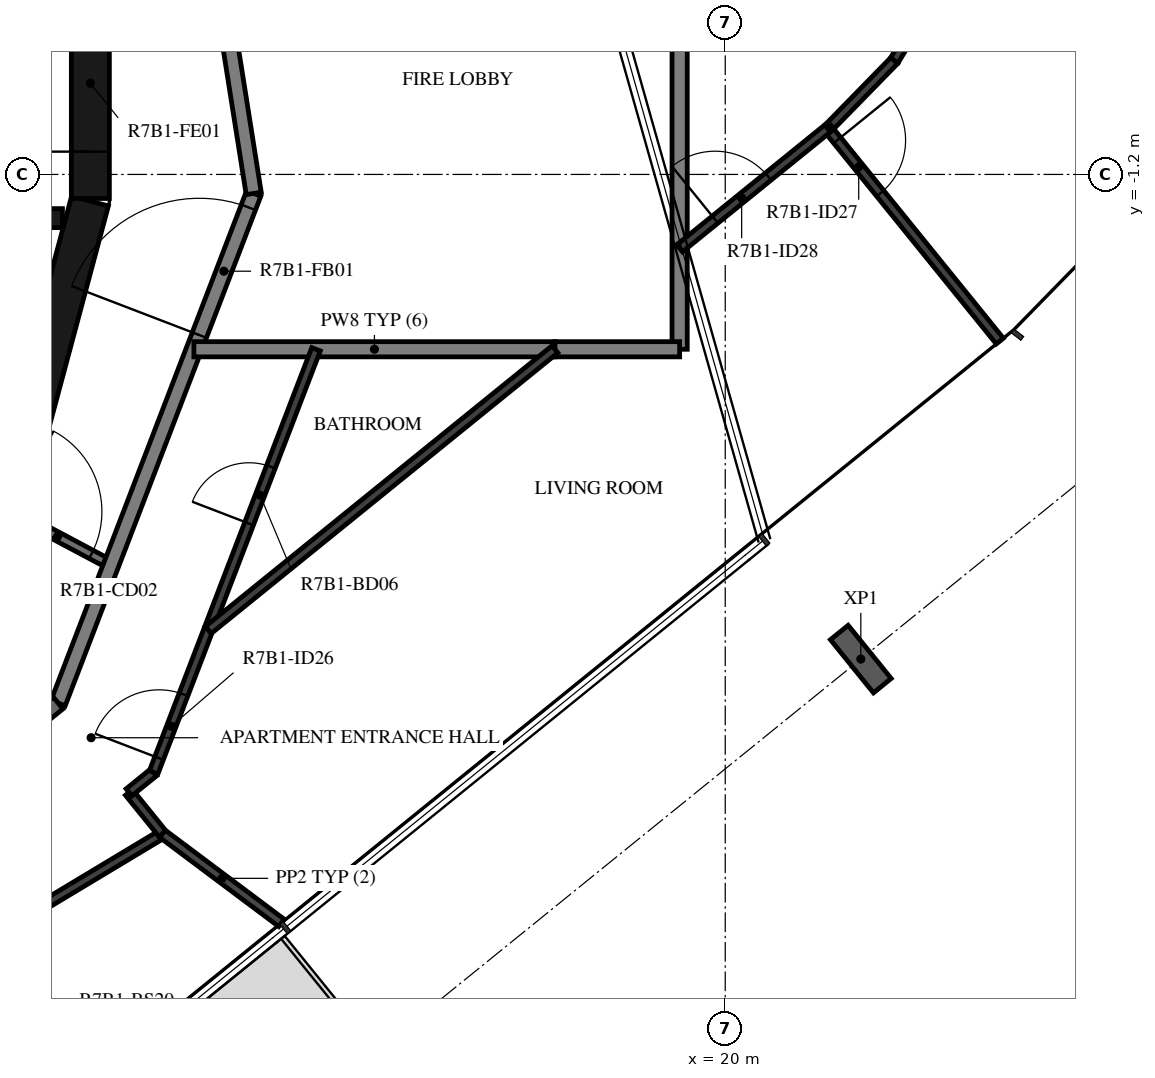
"""IFC4 building model, lengths in metres.
Left out: names, types, materials, properties, quantities, classifications, styles, units other than length and angle.
Written with IfcOpenShell. Run it as: python <this file> out.ifc"""

import sys

from ifc_helpers import new_model, si_unit, direction, frame, frame_2d, origin, origin_2d, place, context, subcontext, project, spatial, rectangle, i_section, extrude, element, fill, save


model = new_model("IFC4")
c1 = context("Model", 3, precision=1e-05, world=origin(), true_north=direction((0.0, 1.0)))
c2 = subcontext(c1, "Body", "Model", "MODEL_VIEW")
j1 = project(units=[si_unit("LENGTHUNIT", "METRE"), si_unit("PLANEANGLEUNIT", "RADIAN")], contexts=[c1])
p1 = place(None, origin())
s1 = spatial("IfcSite", under=j1, at=p1, CompositionType="ELEMENT")
p2 = place(p1, origin())
s2 = spatial("IfcBuilding", under=s1, at=p2, CompositionType="ELEMENT")
p3 = place(p2, frame((0.0, 0.0, 273.9)))
s3 = spatial("IfcBuildingStorey", under=s2, at=p3, CompositionType="ELEMENT", Elevation=273.9)
p4 = place(p3, frame((21.784, -7.576, -0.38), z_axis=(0.0, 0.0, 1.0), x_axis=(-0.777146167973, -0.629320136024, 0.0)))
e1 = element("IfcColumn", 1, at=p4, inside=s3, PredefinedType="COLUMN", context=c2, shape_type="SweptSolid", body=[
    extrude(i_section(OverallWidth=0.3, OverallDepth=0.9, WebThickness=0.019, FlangeThickness=0.035, FilletRadius=0.03, at=origin_2d()), origin(), (0.0, 0.0, 1.0), 3.5),
])
p5 = place(p3, frame((10.858, -4.479, 0.0), z_axis=(0.0, 0.0, 1.0), x_axis=(0.258734743916, 0.965948410781, 0.0)))
e2 = element("IfcWall", 2, at=p5, inside=s3, PredefinedType="SHEAR", context=c2, shape_type="SweptSolid", body=[
    extrude(rectangle(XDim=3.033, YDim=0.5, at=frame_2d((1.516, 0.0))), origin(), (0.0, 0.0, 1.0), 3.12),
])
p6 = place(p3, frame((11.647, -1.516, 0.0), z_axis=(0.0, 0.0, 1.0), x_axis=(0.0, 1.0, 0.0)))
e3 = element("IfcWall", 3, at=p6, inside=s3, PredefinedType="SHEAR", context=c2, shape_type="SweptSolid", body=[
    extrude(rectangle(XDim=3.033, YDim=0.5, at=frame_2d((1.516, 0.0))), origin(), (0.0, 0.0, 1.0), 3.12),
])
p7 = place(p6, frame((0.616, 0.0, 0.0)))
e4 = element("IfcOpeningElement", 4, at=p7, cuts=e3, PredefinedType="OPENING", context=c2, shape_type="SweptSolid", body=[
    extrude(rectangle(XDim=1.8, YDim=2.1, at=frame_2d((0.9, 1.05))), frame((0.0, 0.26, 0.0), z_axis=(0.0, -1.0, 0.0), x_axis=(1.0, 0.0, 0.0)), (0.0, 0.0, 1.0), 0.52),
])
p8 = place(p3, frame((3.35, -1.775, 0.0), z_axis=(0.0, 0.0, 1.0), x_axis=(1.0, 0.0, 0.0)))
e5 = element("IfcWall", 5, at=p8, inside=s3, PredefinedType="SHEAR", context=c2, shape_type="SweptSolid", body=[
    extrude(rectangle(XDim=7.93, YDim=0.25, at=frame_2d((3.965, 0.0))), origin(), (0.0, 0.0, 1.0), 3.12),
])
p9 = place(p8, frame((0.4, 0.0, 0.0)))
e6 = element("IfcOpeningElement", 6, at=p9, cuts=e5, PredefinedType="OPENING", context=c2, shape_type="SweptSolid", body=[
    extrude(rectangle(XDim=1.1, YDim=2.4, at=frame_2d((0.55, 1.2))), frame((0.0, 0.135, 0.0), z_axis=(0.0, -1.0, 0.0), x_axis=(1.0, 0.0, 0.0)), (0.0, 0.0, 1.0), 0.27),
])
p10 = place(p8, frame((2.55, 0.0, 0.0)))
e7 = element("IfcOpeningElement", 7, at=p10, cuts=e5, PredefinedType="OPENING", context=c2, shape_type="SweptSolid", body=[
    extrude(rectangle(XDim=1.1, YDim=2.4, at=frame_2d((0.55, 1.2))), frame((0.0, 0.135, 0.0), z_axis=(0.0, -1.0, 0.0), x_axis=(1.0, 0.0, 0.0)), (0.0, 0.0, 1.0), 0.27),
])
p11 = place(p8, frame((4.7, 0.0, 0.0)))
e8 = element("IfcOpeningElement", 8, at=p11, cuts=e5, PredefinedType="OPENING", context=c2, shape_type="SweptSolid", body=[
    extrude(rectangle(XDim=1.1, YDim=2.4, at=frame_2d((0.55, 1.2))), frame((0.0, 0.135, 0.0), z_axis=(0.0, -1.0, 0.0), x_axis=(1.0, 0.0, 0.0)), (0.0, 0.0, 1.0), 0.27),
])
p12 = place(p3, frame((10.511, -5.589, 0.0), z_axis=(0.0, 0.0, 1.0), x_axis=(0.882983002821, -0.469404960273, 0.0)))
e9 = element("IfcWall", 9, at=p12, inside=s3, PredefinedType="PARTITIONING", context=c2, shape_type="SweptSolid", body=[
    extrude(rectangle(XDim=1.596, YDim=0.12, at=frame_2d((0.798, 0.0))), origin(), (0.0, 0.0, 1.0), 3.12),
])
p13 = place(p12, frame((0.1, 0.0, 0.0)))
e10 = element("IfcOpeningElement", 10, at=p13, cuts=e9, PredefinedType="OPENING", context=c2, shape_type="SweptSolid", body=[
    extrude(rectangle(XDim=1.2, YDim=2.1, at=frame_2d((0.6, 1.05))), frame((0.0, 0.07, 0.0), z_axis=(0.0, -1.0, 0.0), x_axis=(1.0, 0.0, 0.0)), (0.0, 0.0, 1.0), 0.14),
])
p14 = place(p3, frame((11.223, -8.154, 0.0), z_axis=(0.0, 0.0, 1.0), x_axis=(0.358341090983, 0.93359073609, 0.0)))
e11 = element("IfcWall", 11, at=p14, inside=s3, PredefinedType="STANDARD", context=c2, shape_type="SweptSolid", body=[
    extrude(rectangle(XDim=7.181, YDim=0.2, at=frame_2d((3.59, 0.0))), origin(), (0.0, 0.0, 1.0), 3.12),
])
p15 = place(p14, frame((5.185, 0.0, 0.0)))
e12 = element("IfcOpeningElement", 12, at=p15, cuts=e11, PredefinedType="OPENING", context=c2, shape_type="SweptSolid", body=[
    extrude(rectangle(XDim=1.8, YDim=2.1, at=frame_2d((0.9, 1.05))), frame((0.0, 0.11, 0.0), z_axis=(0.0, -1.0, 0.0), x_axis=(1.0, 0.0, 0.0)), (0.0, 0.0, 1.0), 0.22),
])
p16 = place(p3, frame((13.797, -1.45, 0.0), z_axis=(0.0, 0.0, 1.0), x_axis=(-0.156421704315, 0.987690361611, 0.0)))
e13 = element("IfcWall", 13, at=p16, inside=s3, PredefinedType="STANDARD", context=c2, shape_type="SweptSolid", body=[
    extrude(rectangle(XDim=7.181, YDim=0.2, at=frame_2d((3.591, 0.0))), origin(), (0.0, 0.0, 1.0), 3.12),
])
p17 = place(p3, frame((5.643, -12.673, 0.0), z_axis=(0.0, 0.0, 1.0), x_axis=(0.777160148113, 0.629302871585, 0.0)))
e14 = element("IfcWall", 14, at=p17, inside=s3, PredefinedType="STANDARD", context=c2, shape_type="SweptSolid", body=[
    extrude(rectangle(XDim=7.181, YDim=0.2, at=frame_2d((3.59, 0.0))), origin(), (0.0, 0.0, 1.0), 3.12),
])
p18 = place(p17, frame((0.2, 0.0, 0.0)))
e15 = element("IfcOpeningElement", 15, at=p18, cuts=e14, PredefinedType="OPENING", context=c2, shape_type="SweptSolid", body=[
    extrude(rectangle(XDim=1.0, YDim=2.1, at=frame_2d((0.5, 1.05))), frame((0.0, 0.11, 0.0), z_axis=(0.0, -1.0, 0.0), x_axis=(1.0, 0.0, 0.0)), (0.0, 0.0, 1.0), 0.22),
])
p19 = place(p3, frame((13.01, -3.5, 0.0), z_axis=(0.0, 0.0, 1.0), x_axis=(1.0, 0.0, 0.0)))
e16 = element("IfcWall", 16, at=p19, inside=s3, PredefinedType="STANDARD", context=c2, shape_type="SweptSolid", body=[
    extrude(rectangle(XDim=4.75, YDim=0.2, at=frame_2d((2.375, 0.0))), origin(), (0.0, 0.0, 1.0), 3.12),
])
p20 = place(p3, frame((19.4, -3.5, 0.0), z_axis=(0.0, 0.0, 1.0), x_axis=(0.0, 1.0, 0.0)))
e17 = element("IfcWall", 17, at=p20, inside=s3, PredefinedType="STANDARD", context=c2, shape_type="SweptSolid", body=[
    extrude(rectangle(XDim=5.021, YDim=0.2, at=frame_2d((2.511, 0.0))), origin(), (0.0, 0.0, 1.0), 3.12),
])
p21 = place(p3, frame((17.76, -3.5, 0.0), z_axis=(0.0, 0.0, 1.0), x_axis=(1.0, 0.0, 0.0)))
e18 = element("IfcWall", 18, at=p21, inside=s3, PredefinedType="STANDARD", context=c2, shape_type="SweptSolid", body=[
    extrude(rectangle(XDim=1.64, YDim=0.2, at=frame_2d((0.82, 0.0))), origin(), (0.0, 0.0, 1.0), 3.12),
])
p22 = place(p3, frame((10.434, -11.175, 0.0), z_axis=(0.0, 0.0, 1.0), x_axis=(0.857117202926, 0.515121442427, 0.0)))
e19 = element("IfcWall", 19, at=p22, inside=s3, PredefinedType="PARTITIONING", context=c2, shape_type="SweptSolid", body=[
    extrude(rectangle(XDim=2.524, YDim=0.12, at=frame_2d((1.262, 0.0))), origin(), (0.0, 0.0, 1.0), 3.12),
])
p23 = place(p3, frame((12.597, -9.875, 0.0), z_axis=(0.0, 0.0, 1.0), x_axis=(-0.629138198612, 0.77729346263, 0.0)))
e20 = element("IfcWall", 20, at=p23, inside=s3, PredefinedType="PARTITIONING", context=c2, shape_type="SweptSolid", body=[
    extrude(rectangle(XDim=0.702, YDim=0.12, at=frame_2d((0.351, 0.0))), origin(), (0.0, 0.0, 1.0), 3.12),
])
p24 = place(p3, frame((12.156, -9.329, 0.0), z_axis=(0.0, 0.0, 1.0), x_axis=(0.777026645941, 0.629467704888, 0.0)))
e21 = element("IfcWall", 21, at=p24, inside=s3, PredefinedType="PARTITIONING", context=c2, shape_type="SweptSolid", body=[
    extrude(rectangle(XDim=0.417, YDim=0.12, at=frame_2d((0.208, 0.0))), origin(), (0.0, 0.0, 1.0), 3.12),
])
p25 = place(p3, frame((12.479, -9.067, 0.0), z_axis=(0.0, 0.0, 1.0), x_axis=(0.358372669661, 0.933578614601, 0.0)))
e22 = element("IfcWall", 22, at=p25, inside=s3, PredefinedType="PARTITIONING", context=c2, shape_type="SweptSolid", body=[
    extrude(rectangle(XDim=5.963, YDim=0.12, at=frame_2d((2.981, 0.0))), origin(), (0.0, 0.0, 1.0), 3.12),
])
p26 = place(p25, frame((0.2, 0.0, 0.0)))
e23 = element("IfcOpeningElement", 23, at=p26, cuts=e22, PredefinedType="OPENING", context=c2, shape_type="SweptSolid", body=[
    extrude(rectangle(XDim=0.9, YDim=2.1, at=frame_2d((0.45, 1.05))), frame((0.0, 0.07, 0.0), z_axis=(0.0, -1.0, 0.0), x_axis=(1.0, 0.0, 0.0)), (0.0, 0.0, 1.0), 0.14),
])
p27 = place(p25, frame((3.507, 0.0, 0.0)))
e24 = element("IfcOpeningElement", 24, at=p27, cuts=e22, PredefinedType="OPENING", context=c2, shape_type="SweptSolid", body=[
    extrude(rectangle(XDim=0.8, YDim=2.1, at=frame_2d((0.4, 1.05))), frame((0.0, 0.07, 0.0), z_axis=(0.0, -1.0, 0.0), x_axis=(1.0, 0.0, 0.0)), (0.0, 0.0, 1.0), 0.14),
])
p28 = place(p3, frame((22.746, 1.168, 0.0), z_axis=(0.0, 0.0, 1.0), x_axis=(-0.515096534995, -0.857132171626, 0.0)))
e25 = element("IfcWall", 25, at=p28, inside=s3, PredefinedType="PARTITIONING", context=c2, shape_type="SweptSolid", body=[
    extrude(rectangle(XDim=1.016, YDim=0.12, at=frame_2d((0.508, 0.0))), origin(), (0.0, 0.0, 1.0), 3.12),
])
p29 = place(p3, frame((22.223, 0.298, 0.0), z_axis=(0.0, 0.0, 1.0), x_axis=(-0.69880109182, -0.715316037896, 0.0)))
e26 = element("IfcWall", 26, at=p29, inside=s3, PredefinedType="PARTITIONING", context=c2, shape_type="SweptSolid", body=[
    extrude(rectangle(XDim=1.227, YDim=0.12, at=frame_2d((0.614, 0.0))), origin(), (0.0, 0.0, 1.0), 3.12),
])
p30 = place(p3, frame((21.347, -0.595, 0.0), z_axis=(0.0, 0.0, 1.0), x_axis=(0.62934843781, -0.7771232488, 0.0)))
e27 = element("IfcWall", 27, at=p30, inside=s3, PredefinedType="PARTITIONING", context=c2, shape_type="SweptSolid", body=[
    extrude(rectangle(XDim=3.6, YDim=0.12, at=frame_2d((1.8, 0.0))), origin(), (0.0, 0.0, 1.0), 3.12),
])
p31 = place(p30, frame((0.2, 0.0, 0.0)))
e28 = element("IfcOpeningElement", 28, at=p31, cuts=e27, PredefinedType="OPENING", context=c2, shape_type="SweptSolid", body=[
    extrude(rectangle(XDim=0.9, YDim=2.1, at=frame_2d((0.45, 1.05))), frame((0.0, 0.07, 0.0), z_axis=(0.0, -1.0, 0.0), x_axis=(1.0, 0.0, 0.0)), (0.0, 0.0, 1.0), 0.14),
])
p32 = place(p3, frame((19.4, -2.172, 0.0), z_axis=(0.0, 0.0, 1.0), x_axis=(0.777147279935, 0.629318762862, 0.0)))
e29 = element("IfcWall", 29, at=p32, inside=s3, PredefinedType="PARTITIONING", context=c2, shape_type="SweptSolid", body=[
    extrude(rectangle(XDim=2.505, YDim=0.12, at=frame_2d((1.253, 0.0))), origin(), (0.0, 0.0, 1.0), 3.12),
])
p33 = place(p32, frame((0.6, 0.0, 0.0)))
e30 = element("IfcOpeningElement", 30, at=p33, cuts=e29, PredefinedType="OPENING", context=c2, shape_type="SweptSolid", body=[
    extrude(rectangle(XDim=0.9, YDim=2.1, at=frame_2d((0.45, 1.05))), frame((0.0, 0.07, 0.0), z_axis=(0.0, -1.0, 0.0), x_axis=(1.0, 0.0, 0.0)), (0.0, 0.0, 1.0), 0.14),
])
p34 = place(p3, frame((14.161, -11.046, 0.0), z_axis=(0.0, 0.0, 1.0), x_axis=(-0.800434550749, 0.599420161463, 0.0)))
e31 = element("IfcWall", 31, at=p34, inside=s3, PredefinedType="PARTITIONING", context=c2, shape_type="SweptSolid", body=[
    extrude(rectangle(XDim=1.954, YDim=0.12, at=frame_2d((0.977, 0.0))), origin(), (0.0, 0.0, 1.0), 2.73),
])
p35 = place(p3, frame((17.76, -3.5, 0.0), z_axis=(0.0, 0.0, 1.0), x_axis=(-0.777133455716, -0.62933583404, 0.0)))
e32 = element("IfcWall", 32, at=p35, inside=s3, PredefinedType="PARTITIONING", context=c2, shape_type="SweptSolid", body=[
    extrude(rectangle(XDim=5.869, YDim=0.12, at=frame_2d((2.935, 0.0))), origin(), (0.0, 0.0, 1.0), 3.12),
])
p36 = place(p7, origin())
e33 = element("IfcDoor", 33, at=p36, inside=s3, OperationType="DOUBLE_DOOR_SINGLE_SWING", PredefinedType="DOOR", context=c2, shape_type="SweptSolid", body=[
    extrude(rectangle(XDim=1.8, YDim=2.1, at=frame_2d((0.9, 1.05))), frame((0.0, 0.025, 0.0), z_axis=(0.0, -1.0, 0.0), x_axis=(1.0, 0.0, 0.0)), (0.0, 0.0, 1.0), 0.05),
])
fill(e4, e33)
p37 = place(p26, origin())
e34 = element("IfcDoor", 34, at=p37, inside=s3, OperationType="SINGLE_SWING_RIGHT", PredefinedType="DOOR", context=c2, shape_type="SweptSolid", body=[
    extrude(rectangle(XDim=0.9, YDim=2.1, at=frame_2d((0.45, 1.05))), frame((0.0, 0.025, 0.0), z_axis=(0.0, -1.0, 0.0), x_axis=(1.0, 0.0, 0.0)), (0.0, 0.0, 1.0), 0.05),
])
fill(e23, e34)
p38 = place(p27, origin())
e35 = element("IfcDoor", 35, at=p38, inside=s3, OperationType="SINGLE_SWING_RIGHT", PredefinedType="DOOR", context=c2, shape_type="SweptSolid", body=[
    extrude(rectangle(XDim=0.8, YDim=2.1, at=frame_2d((0.4, 1.05))), frame((0.0, 0.025, 0.0), z_axis=(0.0, -1.0, 0.0), x_axis=(1.0, 0.0, 0.0)), (0.0, 0.0, 1.0), 0.05),
])
fill(e24, e35)
p39 = place(p31, origin())
e36 = element("IfcDoor", 36, at=p39, inside=s3, OperationType="SINGLE_SWING_RIGHT", PredefinedType="DOOR", context=c2, shape_type="SweptSolid", body=[
    extrude(rectangle(XDim=0.9, YDim=2.1, at=frame_2d((0.45, 1.05))), frame((0.0, 0.025, 0.0), z_axis=(0.0, -1.0, 0.0), x_axis=(1.0, 0.0, 0.0)), (0.0, 0.0, 1.0), 0.05),
])
fill(e28, e36)
p40 = place(p33, origin())
e37 = element("IfcDoor", 37, at=p40, inside=s3, OperationType="SINGLE_SWING_LEFT", PredefinedType="DOOR", context=c2, shape_type="SweptSolid", body=[
    extrude(rectangle(XDim=0.9, YDim=2.1, at=frame_2d((0.45, 1.05))), frame((0.0, 0.025, 0.0), z_axis=(0.0, -1.0, 0.0), x_axis=(1.0, 0.0, 0.0)), (0.0, 0.0, 1.0), 0.05),
])
fill(e30, e37)
p41 = place(p13, origin())
e38 = element("IfcDoor", 38, at=p41, inside=s3, OperationType="DOUBLE_DOOR_SINGLE_SWING", PredefinedType="DOOR", context=c2, shape_type="SweptSolid", body=[
    extrude(rectangle(XDim=1.2, YDim=2.1, at=frame_2d((0.6, 1.05))), frame((0.0, 0.025, 0.0), z_axis=(0.0, -1.0, 0.0), x_axis=(1.0, 0.0, 0.0)), (0.0, 0.0, 1.0), 0.05),
])
fill(e10, e38)
p42 = place(p15, origin())
e39 = element("IfcDoor", 39, at=p42, inside=s3, OperationType="DOUBLE_DOOR_SINGLE_SWING", PredefinedType="DOOR", context=c2, shape_type="SweptSolid", body=[
    extrude(rectangle(XDim=1.8, YDim=2.1, at=frame_2d((0.9, 1.05))), frame((0.0, 0.025, 0.0), z_axis=(0.0, -1.0, 0.0), x_axis=(1.0, 0.0, 0.0)), (0.0, 0.0, 1.0), 0.05),
])
fill(e12, e39)
save(model, sys.argv[1])
